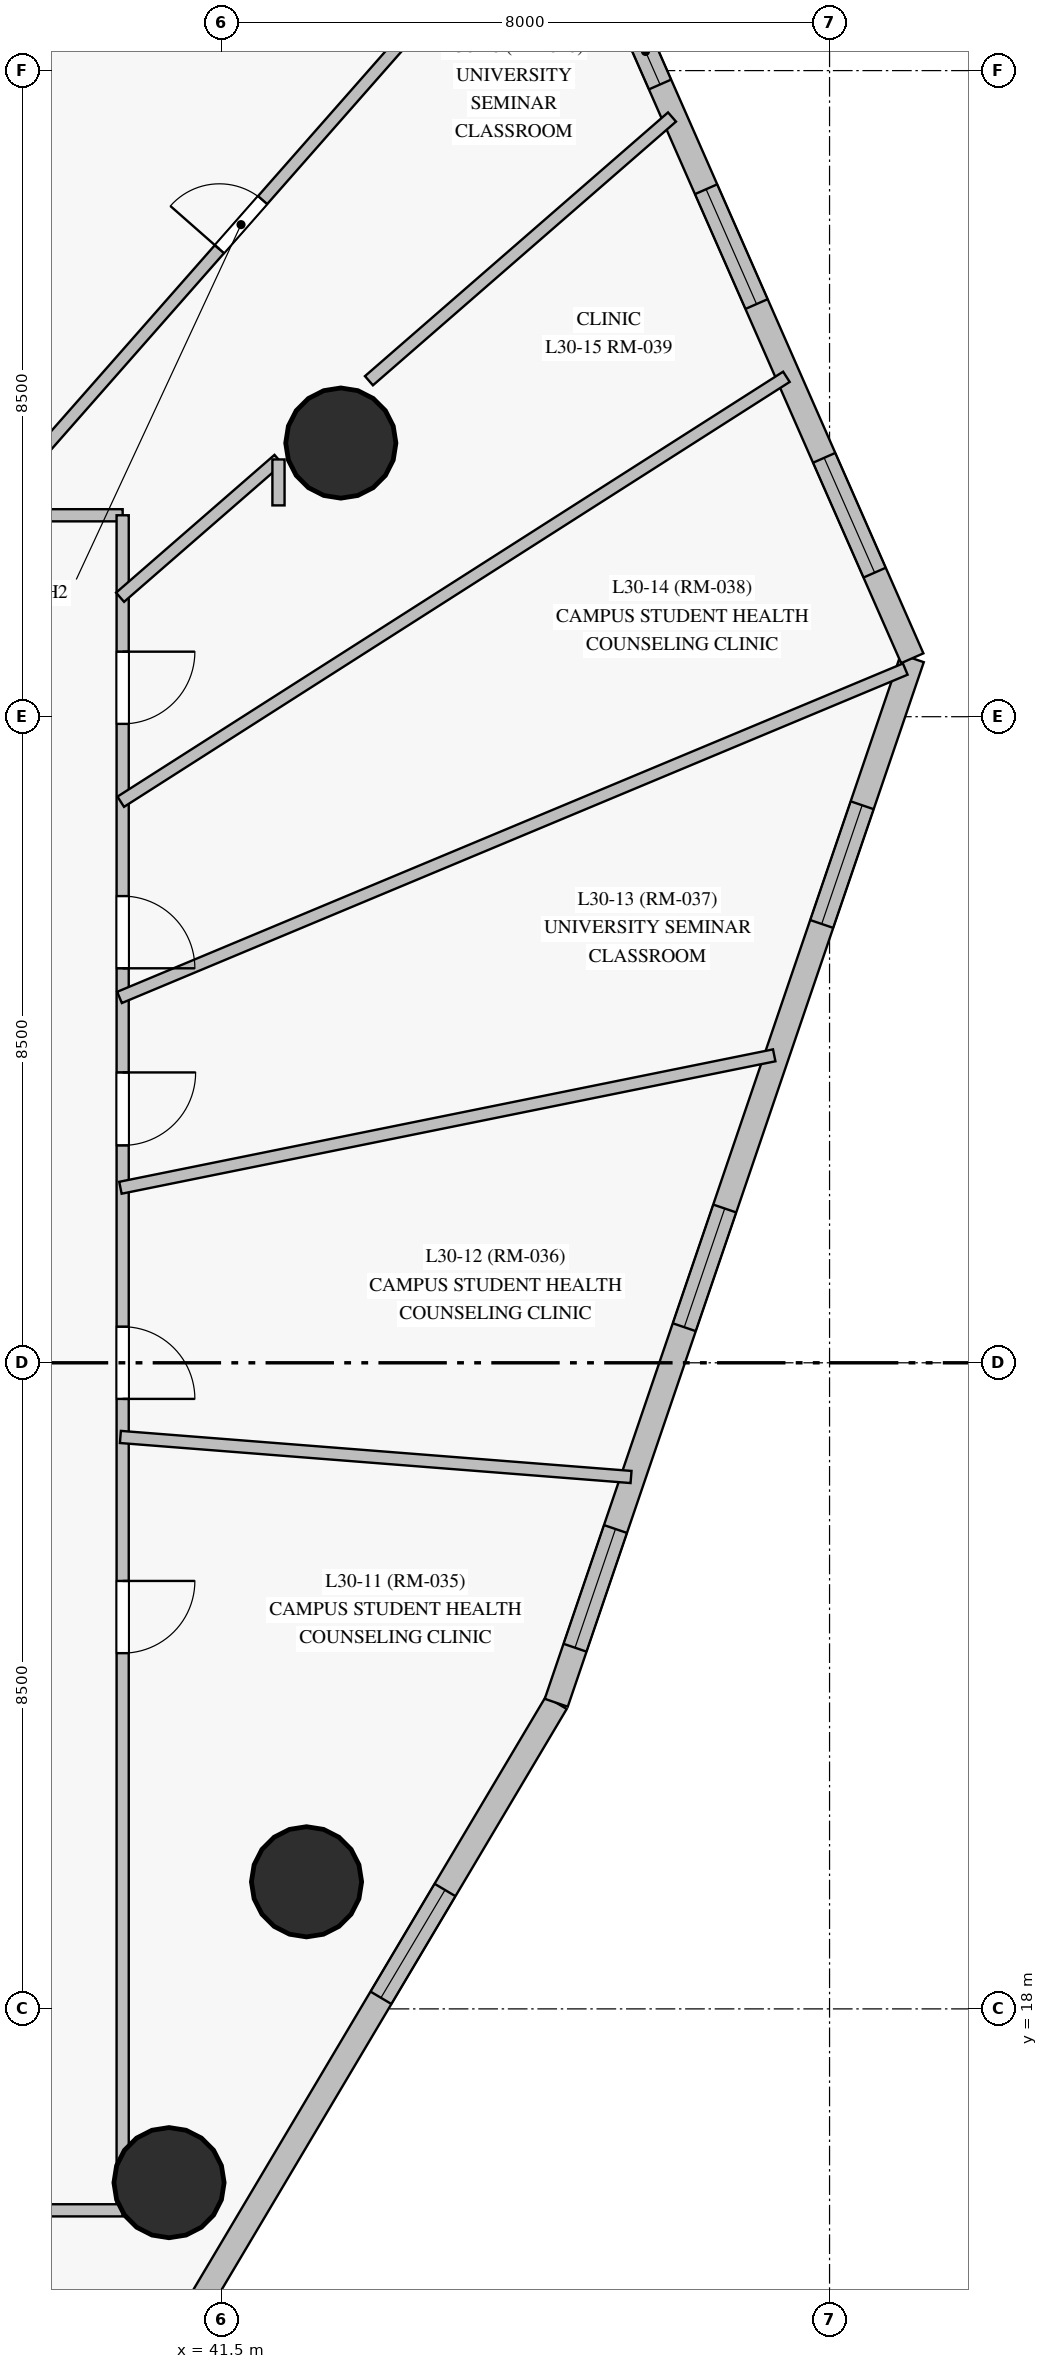
"""IFC4 building model, lengths in metres.
Left out: names, types, materials, properties, quantities, classifications, styles, units other than length and angle.
Written with IfcOpenShell. Run it as: python <this file> out.ifc"""

import sys

from ifc_helpers import new_model, si_unit, direction, frame, frame_2d, origin, origin_with_axes, origin_2d, place, context, subcontext, project, spatial, rectangle, circle, extrude, source, transform, mapped, element, fill, save


model = new_model("IFC4")
c1 = context("Model", 3, precision=1e-05, world=origin(), true_north=direction((0.0, 1.0)))
c2 = subcontext(c1, "Body", "Model", "MODEL_VIEW")
j1 = project(units=[si_unit("LENGTHUNIT", "METRE"), si_unit("PLANEANGLEUNIT", "RADIAN")], contexts=[c1])
p1 = place(None, origin())
s1 = spatial("IfcSite", under=j1, at=p1, CompositionType="ELEMENT")
p2 = place(p1, origin())
s2 = spatial("IfcBuilding", under=s1, at=p2, CompositionType="ELEMENT")
p3 = place(p2, frame((0.0, 0.0, 111.45)))
s3 = spatial("IfcBuildingStorey", under=s2, at=p3, CompositionType="ELEMENT", Elevation=111.45)
m1 = source(origin_with_axes(), c2, "Body", "SweptSolid", [
    extrude(circle(Radius=0.725, at=origin_2d()), origin(), (0.0, 0.0, 1.0), 3.05),
])
for number, where, z_axis, x_axis in (
    (1, (42.619, 19.672, 0.0), (0.0, 0.0, 1.0), (1.0, 0.0, 0.0)),
    (2, (43.07, 38.6, 0.0), (0.0, 0.0, 1.0), (1.0, 0.0, 0.0)),
    (3, (40.81, 15.714, 0.0), (0.0, 0.0, 1.0), (1.0, 0.0, 0.0)),
):
    element("IfcColumn", number, at=place(p3, frame(where, z_axis=z_axis, x_axis=x_axis)), inside=s3, PredefinedType="COLUMN", context=c2, shape_type="MappedRepresentation", body=[
        mapped(m1, transform((0.0, 0.0, 0.0), scale=1.0)),
    ])
p4 = place(p3, frame((40.749, 13.352, 0.0), z_axis=(0.0, 0.0, 1.0), x_axis=(0.510851725042, 0.859668840323, 0.0)))
e4 = element("IfcWall", 4, at=p4, inside=s3, PredefinedType="SOLIDWALL", context=c2, shape_type="SweptSolid", body=[
    extrude(rectangle(XDim=10.092, YDim=0.32, at=frame_2d((5.046, 0.0))), origin(), (0.0, 0.0, 1.0), 2.825),
])
p5 = place(p4, frame((5.577, 0.0, 0.85)))
e5 = element("IfcOpeningElement", 5, at=p5, cuts=e4, PredefinedType="OPENING", context=c2, shape_type="SweptSolid", body=[
    extrude(rectangle(XDim=1.65, YDim=1.65, at=frame_2d((0.825, 0.825))), frame((0.0, 0.17, 0.0), z_axis=(0.0, -1.0, 0.0), x_axis=(1.0, 0.0, 0.0)), (0.0, 0.0, 1.0), 0.34),
])
p6 = place(p3, frame((45.905, 22.027, 0.0), z_axis=(0.0, 0.0, 1.0), x_axis=(0.322607501478, 0.94653283091, 0.0)))
e6 = element("IfcWall", 6, at=p6, inside=s3, PredefinedType="SOLIDWALL", context=c2, shape_type="SweptSolid", body=[
    extrude(rectangle(XDim=14.518, YDim=0.32, at=frame_2d((7.259, 0.0))), origin(), (0.0, 0.0, 1.0), 2.825),
])
p7 = place(p6, frame((0.765, 0.0, 0.85)))
e7 = element("IfcOpeningElement", 7, at=p7, cuts=e6, PredefinedType="OPENING", context=c2, shape_type="SweptSolid", body=[
    extrude(rectangle(XDim=1.65, YDim=1.65, at=frame_2d((0.825, 0.825))), frame((0.0, 0.17, 0.0), z_axis=(0.0, -1.0, 0.0), x_axis=(1.0, 0.0, 0.0)), (0.0, 0.0, 1.0), 0.34),
])
p8 = place(p6, frame((5.22, 0.0, 0.85)))
e8 = element("IfcOpeningElement", 8, at=p8, cuts=e6, PredefinedType="OPENING", context=c2, shape_type="SweptSolid", body=[
    extrude(rectangle(XDim=1.65, YDim=1.65, at=frame_2d((0.825, 0.825))), frame((0.0, 0.17, 0.0), z_axis=(0.0, -1.0, 0.0), x_axis=(1.0, 0.0, 0.0)), (0.0, 0.0, 1.0), 0.34),
])
p9 = place(p6, frame((10.825, 0.0, 0.85)))
e9 = element("IfcOpeningElement", 9, at=p9, cuts=e6, PredefinedType="OPENING", context=c2, shape_type="SweptSolid", body=[
    extrude(rectangle(XDim=1.65, YDim=1.65, at=frame_2d((0.825, 0.825))), frame((0.0, 0.17, 0.0), z_axis=(0.0, -1.0, 0.0), x_axis=(1.0, 0.0, 0.0)), (0.0, 0.0, 1.0), 0.34),
])
p10 = place(p3, frame((50.588, 35.769, 0.0), z_axis=(0.0, 0.0, 1.0), x_axis=(-0.402455807278, 0.915439415357, 0.0)))
e10 = element("IfcWall", 10, at=p10, inside=s3, PredefinedType="SOLIDWALL", context=c2, shape_type="SweptSolid", body=[
    extrude(rectangle(XDim=9.721, YDim=0.32, at=frame_2d((4.861, 0.0))), origin(), (0.0, 0.0, 1.0), 2.825),
])
p11 = place(p10, frame((1.23, 0.0, 0.85)))
e11 = element("IfcOpeningElement", 11, at=p11, cuts=e10, PredefinedType="OPENING", context=c2, shape_type="SweptSolid", body=[
    extrude(rectangle(XDim=1.65, YDim=1.65, at=frame_2d((0.825, 0.825))), frame((0.0, 0.17, 0.0), z_axis=(0.0, -1.0, 0.0), x_axis=(1.0, 0.0, 0.0)), (0.0, 0.0, 1.0), 0.34),
])
p12 = place(p10, frame((5.09, 0.0, 0.85)))
e12 = element("IfcOpeningElement", 12, at=p12, cuts=e10, PredefinedType="OPENING", context=c2, shape_type="SweptSolid", body=[
    extrude(rectangle(XDim=1.65, YDim=1.65, at=frame_2d((0.825, 0.825))), frame((0.0, 0.17, 0.0), z_axis=(0.0, -1.0, 0.0), x_axis=(1.0, 0.0, 0.0)), (0.0, 0.0, 1.0), 0.34),
])
p13 = place(p10, frame((8.246, 0.0, 0.85)))
e13 = element("IfcOpeningElement", 13, at=p13, cuts=e10, PredefinedType="OPENING", context=c2, shape_type="SweptSolid", body=[
    extrude(rectangle(XDim=0.95, YDim=1.5, at=frame_2d((0.475, 0.75))), frame((0.0, 0.17, 0.0), z_axis=(0.0, -1.0, 0.0), x_axis=(1.0, 0.0, 0.0)), (0.0, 0.0, 1.0), 0.34),
])
p14 = place(p3, frame((16.7, 37.65, 0.0), z_axis=(0.0, 0.0, 1.0), x_axis=(1.0, 0.0, 0.0)))
e14 = element("IfcWall", 14, at=p14, inside=s3, PredefinedType="PARTITIONING", context=c2, shape_type="SweptSolid", body=[
    extrude(rectangle(XDim=23.5, YDim=0.16, at=frame_2d((11.75, 0.0))), origin(), (0.0, 0.0, 1.0), 2.325),
])
p15 = place(p14, frame((20.456, 0.0, 0.0)))
e15 = element("IfcOpeningElement", 15, at=p15, cuts=e14, PredefinedType="OPENING", context=c2, shape_type="SweptSolid", body=[
    extrude(rectangle(XDim=0.96, YDim=2.15, at=frame_2d((0.48, 1.075))), frame((0.0, 0.09, 0.0), z_axis=(0.0, -1.0, 0.0), x_axis=(1.0, 0.0, 0.0)), (0.0, 0.0, 1.0), 0.18),
])
p16 = place(p14, frame((19.359, 0.0, 0.0)))
e16 = element("IfcOpeningElement", 16, at=p16, cuts=e14, PredefinedType="OPENING", context=c2, shape_type="SweptSolid", body=[
    extrude(rectangle(XDim=0.95, YDim=2.15, at=frame_2d((0.475, 1.075))), frame((0.0, 0.09, 0.0), z_axis=(0.0, -1.0, 0.0), x_axis=(1.0, 0.0, 0.0)), (0.0, 0.0, 1.0), 0.18),
])
p17 = place(p14, frame((15.91, 0.0, 0.0)))
e17 = element("IfcOpeningElement", 17, at=p17, cuts=e14, PredefinedType="OPENING", context=c2, shape_type="SweptSolid", body=[
    extrude(rectangle(XDim=0.95, YDim=2.15, at=frame_2d((0.475, 1.075))), frame((0.0, 0.09, 0.0), z_axis=(0.0, -1.0, 0.0), x_axis=(1.0, 0.0, 0.0)), (0.0, 0.0, 1.0), 0.18),
])
p18 = place(p14, frame((14.8, 0.0, 0.0)))
e18 = element("IfcOpeningElement", 18, at=p18, cuts=e14, PredefinedType="OPENING", context=c2, shape_type="SweptSolid", body=[
    extrude(rectangle(XDim=0.96, YDim=2.15, at=frame_2d((0.48, 1.075))), frame((0.0, 0.09, 0.0), z_axis=(0.0, -1.0, 0.0), x_axis=(1.0, 0.0, 0.0)), (0.0, 0.0, 1.0), 0.18),
])
p19 = place(p14, frame((11.365, 0.0, 0.0)))
e19 = element("IfcOpeningElement", 19, at=p19, cuts=e14, PredefinedType="OPENING", context=c2, shape_type="SweptSolid", body=[
    extrude(rectangle(XDim=0.95, YDim=2.15, at=frame_2d((0.475, 1.075))), frame((0.0, 0.09, 0.0), z_axis=(0.0, -1.0, 0.0), x_axis=(1.0, 0.0, 0.0)), (0.0, 0.0, 1.0), 0.18),
])
p20 = place(p14, frame((7.75, 0.0, 0.0)))
e20 = element("IfcOpeningElement", 20, at=p20, cuts=e14, PredefinedType="OPENING", context=c2, shape_type="SweptSolid", body=[
    extrude(rectangle(XDim=0.96, YDim=2.15, at=frame_2d((0.48, 1.075))), frame((0.0, 0.09, 0.0), z_axis=(0.0, -1.0, 0.0), x_axis=(1.0, 0.0, 0.0)), (0.0, 0.0, 1.0), 0.18),
])
p21 = place(p14, frame((2.94, 0.0, 0.0)))
e21 = element("IfcOpeningElement", 21, at=p21, cuts=e14, PredefinedType="OPENING", context=c2, shape_type="SweptSolid", body=[
    extrude(rectangle(XDim=0.95, YDim=2.15, at=frame_2d((0.475, 1.075))), frame((0.0, 0.09, 0.0), z_axis=(0.0, -1.0, 0.0), x_axis=(1.0, 0.0, 0.0)), (0.0, 0.0, 1.0), 0.18),
])
p22 = place(p14, frame((17.561, 0.0, 0.0)))
e22 = element("IfcOpeningElement", 22, at=p22, cuts=e14, PredefinedType="OPENING", context=c2, shape_type="SweptSolid", body=[
    extrude(rectangle(XDim=0.86, YDim=2.04, at=frame_2d((0.43, 1.02))), frame((0.0, 0.09, 0.0), z_axis=(0.0, -1.0, 0.0), x_axis=(1.0, 0.0, 0.0)), (0.0, 0.0, 1.0), 0.18),
])
p23 = place(p3, frame((40.2, 37.65, 0.0), z_axis=(0.0, 0.0, 1.0), x_axis=(0.0, -1.0, 0.0)))
e23 = element("IfcWall", 23, at=p23, inside=s3, PredefinedType="PARTITIONING", context=c2, shape_type="SweptSolid", body=[
    extrude(rectangle(XDim=22.3, YDim=0.16, at=frame_2d((11.15, 0.0))), origin(), (0.0, 0.0, 1.0), 2.325),
])
p24 = place(p23, frame((14.02, 0.0, 0.0)))
e24 = element("IfcOpeningElement", 24, at=p24, cuts=e23, PredefinedType="OPENING", context=c2, shape_type="SweptSolid", body=[
    extrude(rectangle(XDim=0.95, YDim=2.15, at=frame_2d((0.475, 1.075))), frame((0.0, 0.09, 0.0), z_axis=(0.0, -1.0, 0.0), x_axis=(1.0, 0.0, 0.0)), (0.0, 0.0, 1.0), 0.18),
])
p25 = place(p23, frame((10.675, 0.0, 0.0)))
e25 = element("IfcOpeningElement", 25, at=p25, cuts=e23, PredefinedType="OPENING", context=c2, shape_type="SweptSolid", body=[
    extrude(rectangle(XDim=0.95, YDim=2.15, at=frame_2d((0.475, 1.075))), frame((0.0, 0.09, 0.0), z_axis=(0.0, -1.0, 0.0), x_axis=(1.0, 0.0, 0.0)), (0.0, 0.0, 1.0), 0.18),
])
p26 = place(p23, frame((7.33, 0.0, 0.0)))
e26 = element("IfcOpeningElement", 26, at=p26, cuts=e23, PredefinedType="OPENING", context=c2, shape_type="SweptSolid", body=[
    extrude(rectangle(XDim=0.96, YDim=2.15, at=frame_2d((0.48, 1.075))), frame((0.0, 0.09, 0.0), z_axis=(0.0, -1.0, 0.0), x_axis=(1.0, 0.0, 0.0)), (0.0, 0.0, 1.0), 0.18),
])
p27 = place(p23, frame((5.01, 0.0, 0.0)))
e27 = element("IfcOpeningElement", 27, at=p27, cuts=e23, PredefinedType="OPENING", context=c2, shape_type="SweptSolid", body=[
    extrude(rectangle(XDim=0.95, YDim=2.15, at=frame_2d((0.475, 1.075))), frame((0.0, 0.09, 0.0), z_axis=(0.0, -1.0, 0.0), x_axis=(1.0, 0.0, 0.0)), (0.0, 0.0, 1.0), 0.18),
])
p28 = place(p23, frame((1.794, 0.0, 0.0)))
e28 = element("IfcOpeningElement", 28, at=p28, cuts=e23, PredefinedType="OPENING", context=c2, shape_type="SweptSolid", body=[
    extrude(rectangle(XDim=0.95, YDim=2.15, at=frame_2d((0.475, 1.075))), frame((0.0, 0.09, 0.0), z_axis=(0.0, -1.0, 0.0), x_axis=(1.0, 0.0, 0.0)), (0.0, 0.0, 1.0), 0.18),
])
p29 = place(p3, frame((40.158, 31.307, 0.0), z_axis=(0.0, 0.0, 1.0), x_axis=(0.922688990562, 0.385545103323, 0.0)))
e29 = element("IfcWall", 29, at=p29, inside=s3, PredefinedType="PARTITIONING", context=c2, shape_type="SweptSolid", body=[
    extrude(rectangle(XDim=11.204, YDim=0.16, at=frame_2d((5.602, 0.0))), origin(), (0.0, 0.0, 1.0), 2.825),
])
p30 = place(p3, frame((35.373, 37.612, 0.0), z_axis=(0.0, 0.0, 1.0), x_axis=(0.522127560248, 0.852867405186, 0.0)))
e30 = element("IfcWall", 30, at=p30, inside=s3, PredefinedType="PARTITIONING", context=c2, shape_type="SweptSolid", body=[
    extrude(rectangle(XDim=11.162, YDim=0.16, at=frame_2d((5.581, 0.0))), origin(), (0.0, 0.0, 1.0), 2.825),
])
p31 = place(p3, frame((40.2, 15.35, 0.0), z_axis=(0.0, 0.0, 1.0), x_axis=(-1.0, 0.0, 0.0)))
e31 = element("IfcWall", 31, at=p31, inside=s3, PredefinedType="PARTITIONING", context=c2, shape_type="SweptSolid", body=[
    extrude(rectangle(XDim=10.65, YDim=0.16, at=frame_2d((5.325, 0.0))), origin(), (0.0, 0.0, 1.0), 2.225),
])
p32 = place(p31, frame((8.202, 0.0, 0.0)))
e32 = element("IfcOpeningElement", 32, at=p32, cuts=e31, PredefinedType="OPENING", context=c2, shape_type="SweptSolid", body=[
    extrude(rectangle(XDim=0.95, YDim=2.15, at=frame_2d((0.475, 1.075))), frame((0.0, 0.09, 0.0), z_axis=(0.0, -1.0, 0.0), x_axis=(1.0, 0.0, 0.0)), (0.0, 0.0, 1.0), 0.18),
])
p33 = place(p31, frame((4.85, 0.0, 0.0)))
e33 = element("IfcOpeningElement", 33, at=p33, cuts=e31, PredefinedType="OPENING", context=c2, shape_type="SweptSolid", body=[
    extrude(rectangle(XDim=0.96, YDim=2.15, at=frame_2d((0.48, 1.075))), frame((0.0, 0.09, 0.0), z_axis=(0.0, -1.0, 0.0), x_axis=(1.0, 0.0, 0.0)), (0.0, 0.0, 1.0), 0.18),
])
p34 = place(p3, frame((40.175, 33.881, 0.0), z_axis=(0.0, 0.0, 1.0), x_axis=(0.842904976607, 0.53806245029, 0.0)))
e34 = element("IfcWall", 34, at=p34, inside=s3, PredefinedType="PARTITIONING", context=c2, shape_type="SweptSolid", body=[
    extrude(rectangle(XDim=10.39, YDim=0.16, at=frame_2d((5.195, 0.0))), origin(), (0.0, 0.0, 1.0), 2.825),
])
p35 = place(p3, frame((38.363, 37.616, 0.0), z_axis=(0.0, 0.0, 1.0), x_axis=(0.660641283191, 0.750701735008, 0.0)))
e35 = element("IfcWall", 35, at=p35, inside=s3, PredefinedType="PARTITIONING", context=c2, shape_type="SweptSolid", body=[
    extrude(rectangle(XDim=10.277, YDim=0.16, at=frame_2d((5.138, 0.0))), origin(), (0.0, 0.0, 1.0), 2.825),
])
p36 = place(p35, frame((4.708, 0.0, 0.0)))
e36 = element("IfcOpeningElement", 36, at=p36, cuts=e35, PredefinedType="OPENING", context=c2, shape_type="SweptSolid", body=[
    extrude(rectangle(XDim=0.86, YDim=2.04, at=frame_2d((0.43, 1.02))), frame((0.0, 0.09, 0.0), z_axis=(0.0, -1.0, 0.0), x_axis=(1.0, 0.0, 0.0)), (0.0, 0.0, 1.0), 0.18),
])
p37 = place(p3, frame((40.171, 28.803, 0.0), z_axis=(0.0, 0.0, 1.0), x_axis=(0.980097317827, 0.198517625387, 0.0)))
e37 = element("IfcWall", 37, at=p37, inside=s3, PredefinedType="PARTITIONING", context=c2, shape_type="SweptSolid", body=[
    extrude(rectangle(XDim=8.776, YDim=0.16, at=frame_2d((4.388, 0.0))), origin(), (0.0, 0.0, 1.0), 2.825),
])
p38 = place(p3, frame((40.17, 25.524, 0.0), z_axis=(0.0, 0.0, 1.0), x_axis=(0.996941754845, -0.078148176226, 0.0)))
e38 = element("IfcWall", 38, at=p38, inside=s3, PredefinedType="PARTITIONING", context=c2, shape_type="SweptSolid", body=[
    extrude(rectangle(XDim=6.739, YDim=0.16, at=frame_2d((3.369, 0.0))), origin(), (0.0, 0.0, 1.0), 2.825),
])
p39 = place(p3, frame((43.44, 39.42, 0.0), z_axis=(0.0, 0.0, 1.0), x_axis=(0.754393669879, 0.656422265654, 0.0)))
e39 = element("IfcWall", 39, at=p39, inside=s3, PredefinedType="PARTITIONING", context=c2, shape_type="SweptSolid", body=[
    extrude(rectangle(XDim=5.285, YDim=0.16, at=frame_2d((2.643, 0.0))), origin(), (0.0, 0.0, 1.0), 2.825),
])
p40 = place(p3, frame((40.166, 36.571, 0.0), z_axis=(0.0, 0.0, 1.0), x_axis=(0.754413317587, 0.656399684831, 0.0)))
e40 = element("IfcWall", 40, at=p40, inside=s3, PredefinedType="PARTITIONING", context=c2, shape_type="SweptSolid", body=[
    extrude(rectangle(XDim=2.762, YDim=0.16, at=frame_2d((1.381, 0.0))), origin(), (0.0, 0.0, 1.0), 2.225),
])
p41 = place(p3, frame((42.25, 38.385, 0.0), z_axis=(0.0, 0.0, 1.0), x_axis=(0.0, -1.0, 0.0)))
e41 = element("IfcWall", 41, at=p41, inside=s3, PredefinedType="PARTITIONING", context=c2, shape_type="SweptSolid", body=[
    extrude(rectangle(XDim=0.604, YDim=0.16, at=frame_2d((0.302, 0.0))), origin(), (0.0, 0.0, 1.0), 2.325),
])
m2 = source(origin_with_axes(), c2, "Body", "SweptSolid", [
    extrude(rectangle(XDim=1.65, YDim=1.65, at=frame_2d((0.825, 0.825))), frame((0.0, 0.03, 0.0), z_axis=(0.0, -1.0, 0.0), x_axis=(1.0, 0.0, 0.0)), (0.0, 0.0, 1.0), 0.06),
])
p42 = place(p5, origin())
e42 = element("IfcWindow", 42, at=p42, inside=s3, PartitioningType="SINGLE_PANEL", PredefinedType="WINDOW", context=c2, shape_type="MappedRepresentation", body=[
    mapped(m2, transform((0.0, 0.0, 0.0), scale=1.0)),
])
fill(e5, e42)
p43 = place(p7, origin())
e43 = element("IfcWindow", 43, at=p43, inside=s3, PartitioningType="SINGLE_PANEL", PredefinedType="WINDOW", context=c2, shape_type="MappedRepresentation", body=[
    mapped(m2, transform((0.0, 0.0, 0.0), scale=1.0)),
])
fill(e7, e43)
p44 = place(p8, origin())
e44 = element("IfcWindow", 44, at=p44, inside=s3, PartitioningType="SINGLE_PANEL", PredefinedType="WINDOW", context=c2, shape_type="MappedRepresentation", body=[
    mapped(m2, transform((0.0, 0.0, 0.0), scale=1.0)),
])
fill(e8, e44)
p45 = place(p9, origin())
e45 = element("IfcWindow", 45, at=p45, inside=s3, PartitioningType="SINGLE_PANEL", PredefinedType="WINDOW", context=c2, shape_type="MappedRepresentation", body=[
    mapped(m2, transform((0.0, 0.0, 0.0), scale=1.0)),
])
fill(e9, e45)
p46 = place(p11, origin())
e46 = element("IfcWindow", 46, at=p46, inside=s3, PartitioningType="SINGLE_PANEL", PredefinedType="WINDOW", context=c2, shape_type="MappedRepresentation", body=[
    mapped(m2, transform((0.0, 0.0, 0.0), scale=1.0)),
])
fill(e11, e46)
p47 = place(p12, origin())
e47 = element("IfcWindow", 47, at=p47, inside=s3, PartitioningType="SINGLE_PANEL", PredefinedType="WINDOW", context=c2, shape_type="MappedRepresentation", body=[
    mapped(m2, transform((0.0, 0.0, 0.0), scale=1.0)),
])
fill(e12, e47)
m3 = source(origin_with_axes(), c2, "Body", "SweptSolid", [
    extrude(rectangle(XDim=0.95, YDim=1.5, at=frame_2d((0.475, 0.75))), frame((0.0, 0.03, 0.0), z_axis=(0.0, -1.0, 0.0), x_axis=(1.0, 0.0, 0.0)), (0.0, 0.0, 1.0), 0.06),
])
p48 = place(p13, origin())
e48 = element("IfcWindow", 48, at=p48, inside=s3, PartitioningType="SINGLE_PANEL", PredefinedType="WINDOW", context=c2, shape_type="MappedRepresentation", body=[
    mapped(m3, transform((0.0, 0.0, 0.0), scale=1.0)),
])
fill(e13, e48)
m4 = source(origin_with_axes(), c2, "Body", "SweptSolid", [
    extrude(rectangle(XDim=0.95, YDim=2.15, at=frame_2d((0.475, 1.075))), frame((0.0, 0.025, 0.0), z_axis=(0.0, -1.0, 0.0), x_axis=(1.0, 0.0, 0.0)), (0.0, 0.0, 1.0), 0.05),
])
p49 = place(p24, origin())
e49 = element("IfcDoor", 49, at=p49, inside=s3, OperationType="SINGLE_SWING_LEFT", PredefinedType="DOOR", context=c2, shape_type="MappedRepresentation", body=[
    mapped(m4, transform((0.0, 0.0, 0.0), scale=1.0)),
])
fill(e24, e49)
p50 = place(p25, origin())
e50 = element("IfcDoor", 50, at=p50, inside=s3, OperationType="SINGLE_SWING_RIGHT", PredefinedType="DOOR", context=c2, shape_type="MappedRepresentation", body=[
    mapped(m4, transform((0.0, 0.0, 0.0), scale=1.0)),
])
fill(e25, e50)
m5 = source(origin_with_axes(), c2, "Body", "SweptSolid", [
    extrude(rectangle(XDim=0.96, YDim=2.15, at=frame_2d((0.48, 1.075))), frame((0.0, 0.025, 0.0), z_axis=(0.0, -1.0, 0.0), x_axis=(1.0, 0.0, 0.0)), (0.0, 0.0, 1.0), 0.05),
])
p51 = place(p26, origin())
e51 = element("IfcDoor", 51, at=p51, inside=s3, OperationType="SINGLE_SWING_LEFT", PredefinedType="DOOR", context=c2, shape_type="MappedRepresentation", body=[
    mapped(m5, transform((0.0, 0.0, 0.0), scale=1.0)),
])
fill(e26, e51)
p52 = place(p27, origin())
e52 = element("IfcDoor", 52, at=p52, inside=s3, OperationType="SINGLE_SWING_RIGHT", PredefinedType="DOOR", context=c2, shape_type="MappedRepresentation", body=[
    mapped(m4, transform((0.0, 0.0, 0.0), scale=1.0)),
])
fill(e27, e52)
p53 = place(p28, origin())
e53 = element("IfcDoor", 53, at=p53, inside=s3, OperationType="SINGLE_SWING_LEFT", PredefinedType="DOOR", context=c2, shape_type="MappedRepresentation", body=[
    mapped(m4, transform((0.0, 0.0, 0.0), scale=1.0)),
])
fill(e28, e53)
m6 = source(origin_with_axes(), c2, "Body", "SweptSolid", [
    extrude(rectangle(XDim=0.86, YDim=2.04, at=frame_2d((0.43, 1.02))), frame((0.0, 0.025, 0.0), z_axis=(0.0, -1.0, 0.0), x_axis=(1.0, 0.0, 0.0)), (0.0, 0.0, 1.0), 0.05),
])
p54 = place(p36, origin())
e54 = element("IfcDoor", 54, at=p54, inside=s3, OperationType="SINGLE_SWING_LEFT", PredefinedType="DOOR", context=c2, shape_type="MappedRepresentation", body=[
    mapped(m6, transform((0.0, 0.0, 0.0), scale=1.0)),
])
fill(e36, e54)
save(model, sys.argv[1])
